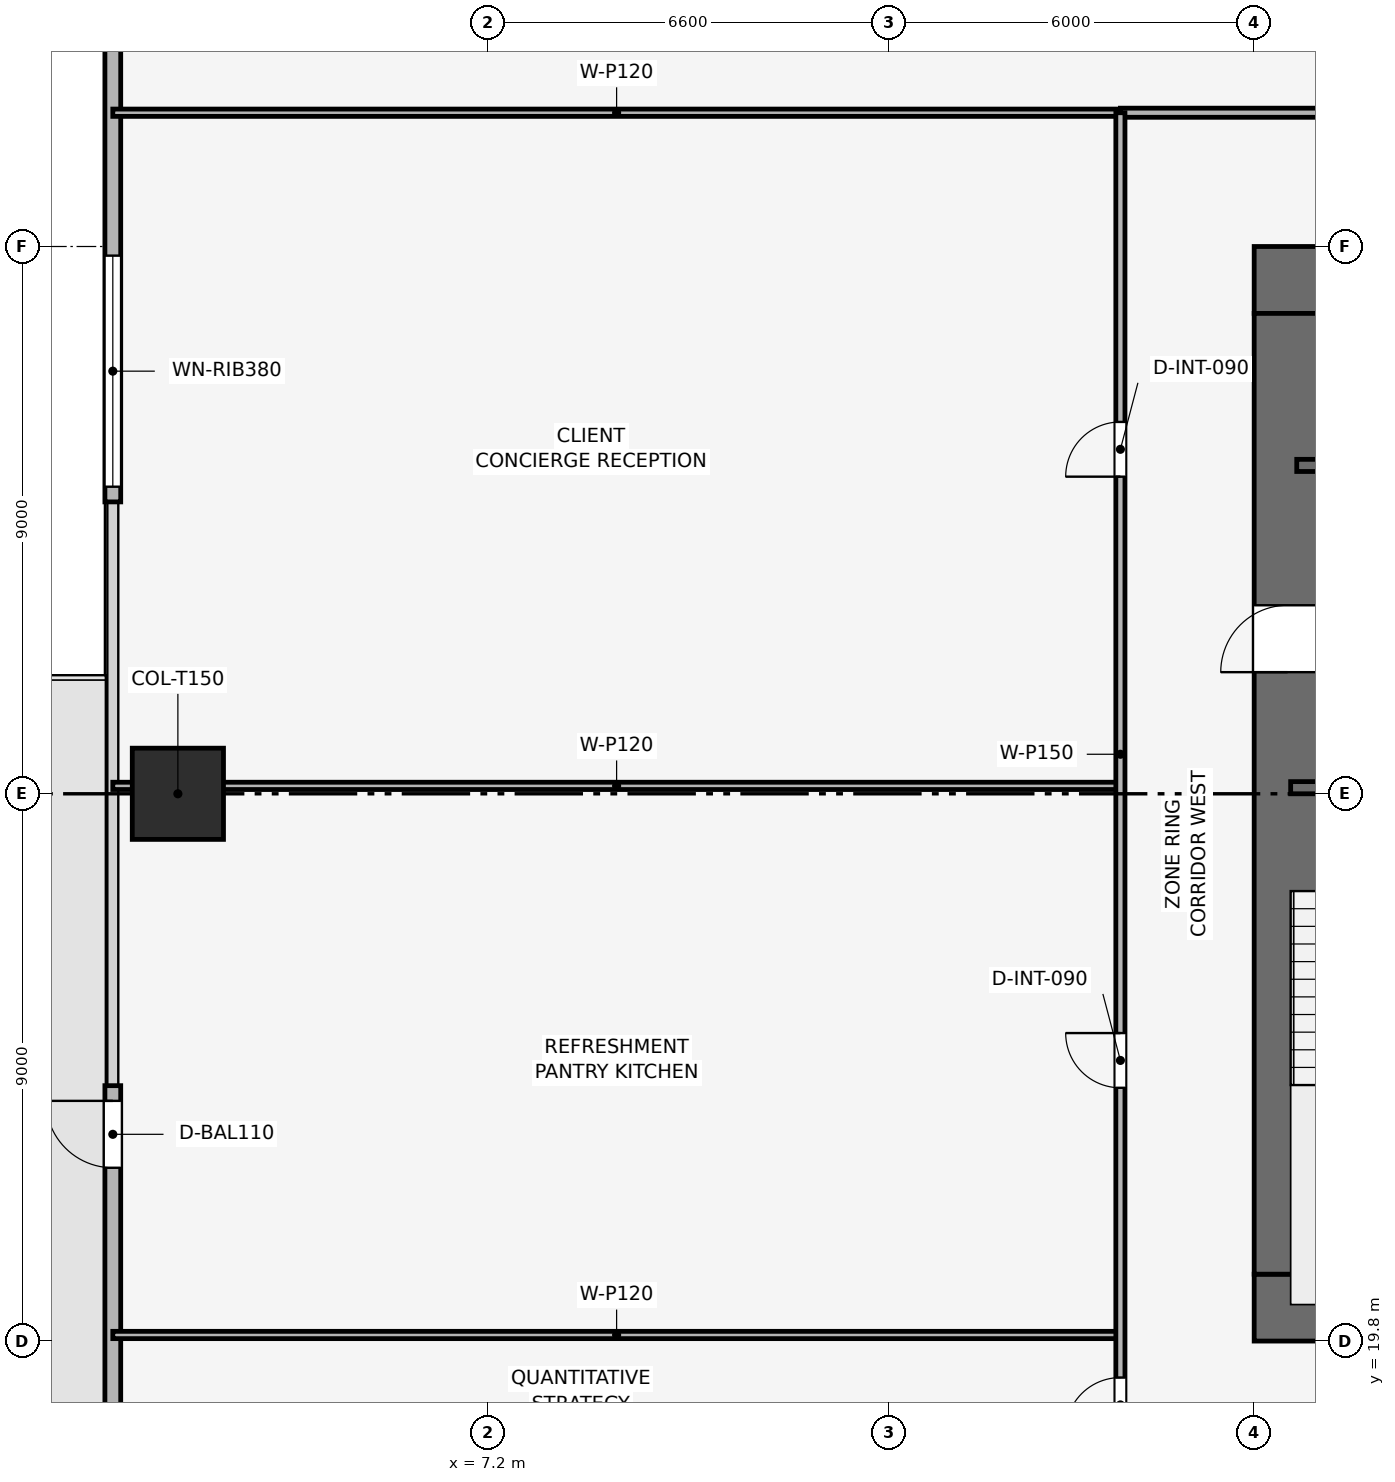
"""IFC4 building model, lengths in metres.
Left out: names, types, materials, properties, quantities, classifications, styles, units other than length and angle.
Written with IfcOpenShell. Run it as: python <this file> out.ifc"""

import sys

from ifc_helpers import new_model, si_unit, direction, frame, frame_2d, origin, origin_2d, place, context, subcontext, project, spatial, rectangle, extrude, element, fill, save


model = new_model("IFC4")
c1 = context("Model", 3, precision=1e-05, world=origin(), true_north=direction((0.0, 1.0)))
c2 = subcontext(c1, "Body", "Model", "MODEL_VIEW")
j1 = project(units=[si_unit("LENGTHUNIT", "METRE"), si_unit("PLANEANGLEUNIT", "RADIAN")], contexts=[c1])
p1 = place(None, origin())
s1 = spatial("IfcSite", under=j1, at=p1, CompositionType="ELEMENT")
p2 = place(p1, origin())
s2 = spatial("IfcBuilding", under=s1, at=p2, CompositionType="ELEMENT")
p3 = place(p2, frame((0.0, 0.0, 92.4)))
s3 = spatial("IfcBuildingStorey", under=s2, at=p3, CompositionType="ELEMENT", Elevation=92.4)
p4 = place(p3, frame((19.8, 20.35, 0.0), z_axis=(0.0, 0.0, 1.0), x_axis=(1.0, 0.0, 0.0)))
e1 = element("IfcWall", 1, at=p4, inside=s3, PredefinedType="SHEAR", context=c2, shape_type="SweptSolid", body=[
    extrude(rectangle(XDim=18.0, YDim=1.1, at=frame_2d((9.0, 0.0))), origin(), (0.0, 0.0, 1.0), 3.9),
])
p5 = place(p4, frame((8.4, 0.0, 0.0)))
e2 = element("IfcOpeningElement", 2, at=p5, cuts=e1, PredefinedType="OPENING", context=c2, shape_type="SweptSolid", body=[
    extrude(rectangle(XDim=1.2, YDim=2.2, at=frame_2d((0.6, 1.1))), frame((0.0, 0.56, 0.0), z_axis=(0.0, -1.0, 0.0), x_axis=(1.0, 0.0, 0.0)), (0.0, 0.0, 1.0), 1.12),
])
p6 = place(p3, frame((19.8, 37.25, 0.0), z_axis=(0.0, 0.0, 1.0), x_axis=(1.0, 0.0, 0.0)))
e3 = element("IfcWall", 3, at=p6, inside=s3, PredefinedType="SHEAR", context=c2, shape_type="SweptSolid", body=[
    extrude(rectangle(XDim=18.0, YDim=1.1, at=frame_2d((9.0, 0.0))), origin(), (0.0, 0.0, 1.0), 3.9),
])
p7 = place(p6, frame((7.05, 0.0, 0.0)))
e4 = element("IfcOpeningElement", 4, at=p7, cuts=e3, PredefinedType="OPENING", context=c2, shape_type="SweptSolid", body=[
    extrude(rectangle(XDim=1.1, YDim=2.15, at=frame_2d((0.55, 1.075))), frame((0.0, 0.56, 0.0), z_axis=(0.0, -1.0, 0.0), x_axis=(1.0, 0.0, 0.0)), (0.0, 0.0, 1.0), 1.12),
])
p8 = place(p3, frame((20.35, 20.9, 0.0), z_axis=(0.0, 0.0, 1.0), x_axis=(0.0, 1.0, 0.0)))
e5 = element("IfcWall", 5, at=p8, inside=s3, PredefinedType="SHEAR", context=c2, shape_type="SweptSolid", body=[
    extrude(rectangle(XDim=15.8, YDim=1.1, at=frame_2d((7.9, 0.0))), origin(), (0.0, 0.0, 1.0), 3.9),
])
p9 = place(p8, frame((9.9, 0.0, 0.0)))
e6 = element("IfcOpeningElement", 6, at=p9, cuts=e5, PredefinedType="OPENING", context=c2, shape_type="SweptSolid", body=[
    extrude(rectangle(XDim=1.1, YDim=2.15, at=frame_2d((0.55, 1.075))), frame((0.0, 0.56, 0.0), z_axis=(0.0, -1.0, 0.0), x_axis=(1.0, 0.0, 0.0)), (0.0, 0.0, 1.0), 1.12),
])
p10 = place(p3, frame((2.1, 28.8, 0.003), z_axis=(0.0, 0.0, 1.0), x_axis=(1.0, 0.0, 0.0)))
e7 = element("IfcColumn", 7, at=p10, inside=s3, PredefinedType="COLUMN", context=c2, shape_type="SweptSolid", body=[
    extrude(rectangle(XDim=1.5, YDim=1.5, at=origin_2d()), origin(), (0.0, 0.0, 1.0), 3.644),
])
p11 = place(p3, frame((1.03, 8.7, 0.0), z_axis=(0.0, 0.0, 1.0), x_axis=(0.0, 1.0, 0.0)))
e8 = element("IfcWall", 8, at=p11, inside=s3, PredefinedType="SOLIDWALL", context=c2, shape_type="SweptSolid", body=[
    extrude(rectangle(XDim=15.3, YDim=0.26, at=frame_2d((7.65, 0.0))), origin(), (0.0, 0.0, 1.0), 3.65),
])
p12 = place(p11, frame((13.95, 0.0, 0.0)))
e9 = element("IfcOpeningElement", 9, at=p12, cuts=e8, PredefinedType="OPENING", context=c2, shape_type="SweptSolid", body=[
    extrude(rectangle(XDim=1.1, YDim=2.2, at=frame_2d((0.55, 1.1))), frame((0.0, 0.14, 0.0), z_axis=(0.0, -1.0, 0.0), x_axis=(1.0, 0.0, 0.0)), (0.0, 0.0, 1.0), 0.28),
])
p13 = place(p3, frame((1.03, 33.6, 0.0), z_axis=(0.0, 0.0, 1.0), x_axis=(0.0, 1.0, 0.0)))
e10 = element("IfcWall", 10, at=p13, inside=s3, PredefinedType="SOLIDWALL", context=c2, shape_type="SweptSolid", body=[
    extrude(rectangle(XDim=15.3, YDim=0.26, at=frame_2d((7.65, 0.0))), origin(), (0.0, 0.0, 1.0), 3.65),
])
p14 = place(p13, frame((0.25, 0.0, 0.9)))
e11 = element("IfcOpeningElement", 11, at=p14, cuts=e10, PredefinedType="OPENING", context=c2, shape_type="SweptSolid", body=[
    extrude(rectangle(XDim=3.8, YDim=1.9, at=frame_2d((1.9, 0.95))), frame((0.0, 0.14, 0.0), z_axis=(0.0, -1.0, 0.0), x_axis=(1.0, 0.0, 0.0)), (0.0, 0.0, 1.0), 0.28),
])
p15 = place(p3, frame((20.4, 28.9, 0.0), z_axis=(0.0, 0.0, 1.0), x_axis=(1.0, 0.0, 0.0)))
e12 = element("IfcWall", 12, at=p15, inside=s3, PredefinedType="SHEAR", context=c2, shape_type="SweptSolid", body=[
    extrude(rectangle(XDim=3.15, YDim=0.2, at=frame_2d((1.575, 0.0))), origin(), (0.0, 0.0, 1.0), 3.65),
])
p16 = place(p15, frame((0.8, 0.0, 0.0)))
e13 = element("IfcOpeningElement", 13, at=p16, cuts=e12, PredefinedType="OPENING", context=c2, shape_type="SweptSolid", body=[
    extrude(rectangle(XDim=1.0, YDim=2.1, at=frame_2d((0.5, 1.05))), frame((0.0, 0.11, 0.0), z_axis=(0.0, -1.0, 0.0), x_axis=(1.0, 0.0, 0.0)), (0.0, 0.0, 1.0), 0.22),
])
p17 = place(p3, frame((20.5, 34.2, 0.0), z_axis=(0.0, 0.0, 1.0), x_axis=(1.0, 0.0, 0.0)))
e14 = element("IfcWall", 14, at=p17, inside=s3, PredefinedType="SHEAR", context=c2, shape_type="SweptSolid", body=[
    extrude(rectangle(XDim=3.05, YDim=0.2, at=frame_2d((1.525, 0.0))), origin(), (0.0, 0.0, 1.0), 3.65),
])
p18 = place(p17, frame((0.75, 0.0, 0.0)))
e15 = element("IfcOpeningElement", 15, at=p18, cuts=e14, PredefinedType="OPENING", context=c2, shape_type="SweptSolid", body=[
    extrude(rectangle(XDim=1.1, YDim=2.15, at=frame_2d((0.55, 1.075))), frame((0.0, 0.11, 0.0), z_axis=(0.0, -1.0, 0.0), x_axis=(1.0, 0.0, 0.0)), (0.0, 0.0, 1.0), 0.22),
])
for number, where, z_axis, x_axis in (
    (16, (1.03, 40.0, 0.0), (0.0, 0.0, 1.0), (1.0, 0.0, 0.0)),
    (17, (1.03, 19.9, 0.0), (0.0, 0.0, 1.0), (1.0, 0.0, 0.0)),
):
    element("IfcWall", number, at=place(p3, frame(where, z_axis=z_axis, x_axis=x_axis)), inside=s3, PredefinedType="PARTITIONING", context=c2, shape_type="SweptSolid", body=[
        extrude(rectangle(XDim=16.57, YDim=0.12, at=frame_2d((8.285, 0.0))), origin(), (0.0, 0.0, 1.0), 2.935),
    ])
p19 = place(p3, frame((1.03, 28.93, 0.0), z_axis=(0.0, 0.0, 1.0), x_axis=(1.0, 0.0, 0.0)))
e18 = element("IfcWall", 18, at=p19, inside=s3, PredefinedType="PARTITIONING", context=c2, shape_type="SweptSolid", body=[
    extrude(rectangle(XDim=16.57, YDim=0.12, at=frame_2d((8.285, 0.0))), origin(), (0.0, 0.0, 1.0), 3.085),
])
p20 = place(p3, frame((17.6, 40.0, 0.0), z_axis=(0.0, 0.0, 1.0), x_axis=(1.0, 0.0, 0.0)))
e19 = element("IfcWall", 19, at=p20, inside=s3, PredefinedType="PARTITIONING", context=c2, shape_type="SweptSolid", body=[
    extrude(rectangle(XDim=22.4, YDim=0.15, at=frame_2d((11.2, 0.0))), origin(), (0.0, 0.0, 1.0), 3.085),
])
p21 = place(p20, frame((10.75, 0.0, 0.0)))
e20 = element("IfcOpeningElement", 20, at=p21, cuts=e19, PredefinedType="OPENING", context=c2, shape_type="SweptSolid", body=[
    extrude(rectangle(XDim=0.9, YDim=2.1, at=frame_2d((0.45, 1.05))), frame((0.0, 0.085, 0.0), z_axis=(0.0, -1.0, 0.0), x_axis=(1.0, 0.0, 0.0)), (0.0, 0.0, 1.0), 0.17),
])
p22 = place(p3, frame((17.6, 17.6, 0.0), z_axis=(0.0, 0.0, 1.0), x_axis=(0.0, 1.0, 0.0)))
e21 = element("IfcWall", 21, at=p22, inside=s3, PredefinedType="PARTITIONING", context=c2, shape_type="SweptSolid", body=[
    extrude(rectangle(XDim=22.4, YDim=0.15, at=frame_2d((11.2, 0.0))), origin(), (0.0, 0.0, 1.0), 3.085),
])
p23 = place(p22, frame((0.7, 0.0, 0.0)))
e22 = element("IfcOpeningElement", 22, at=p23, cuts=e21, PredefinedType="OPENING", context=c2, shape_type="SweptSolid", body=[
    extrude(rectangle(XDim=0.9, YDim=2.1, at=frame_2d((0.45, 1.05))), frame((0.0, 0.085, 0.0), z_axis=(0.0, -1.0, 0.0), x_axis=(1.0, 0.0, 0.0)), (0.0, 0.0, 1.0), 0.17),
])
p24 = place(p22, frame((6.365, 0.0, 0.0)))
e23 = element("IfcOpeningElement", 23, at=p24, cuts=e21, PredefinedType="OPENING", context=c2, shape_type="SweptSolid", body=[
    extrude(rectangle(XDim=0.9, YDim=2.1, at=frame_2d((0.45, 1.05))), frame((0.0, 0.085, 0.0), z_axis=(0.0, -1.0, 0.0), x_axis=(1.0, 0.0, 0.0)), (0.0, 0.0, 1.0), 0.17),
])
p25 = place(p22, frame((16.415, 0.0, 0.0)))
e24 = element("IfcOpeningElement", 24, at=p25, cuts=e21, PredefinedType="OPENING", context=c2, shape_type="SweptSolid", body=[
    extrude(rectangle(XDim=0.9, YDim=2.1, at=frame_2d((0.45, 1.05))), frame((0.0, 0.085, 0.0), z_axis=(0.0, -1.0, 0.0), x_axis=(1.0, 0.0, 0.0)), (0.0, 0.0, 1.0), 0.17),
])
p26 = place(p12, origin())
e25 = element("IfcDoor", 25, at=p26, inside=s3, OperationType="SINGLE_SWING_RIGHT", PredefinedType="DOOR", context=c2, shape_type="SweptSolid", body=[
    extrude(rectangle(XDim=1.1, YDim=2.2, at=frame_2d((0.55, 1.1))), frame((0.0, 0.025, 0.0), z_axis=(0.0, -1.0, 0.0), x_axis=(1.0, 0.0, 0.0)), (0.0, 0.0, 1.0), 0.05),
])
fill(e9, e25)
p27 = place(p14, origin())
e26 = element("IfcWindow", 26, at=p27, inside=s3, PartitioningType="SINGLE_PANEL", PredefinedType="WINDOW", context=c2, shape_type="SweptSolid", body=[
    extrude(rectangle(XDim=3.8, YDim=1.9, at=frame_2d((1.9, 0.95))), frame((0.0, 0.03, 0.0), z_axis=(0.0, -1.0, 0.0), x_axis=(1.0, 0.0, 0.0)), (0.0, 0.0, 1.0), 0.06),
])
fill(e11, e26)
p28 = place(p23, origin())
e27 = element("IfcDoor", 27, at=p28, inside=s3, OperationType="SINGLE_SWING_LEFT", PredefinedType="DOOR", context=c2, shape_type="SweptSolid", body=[
    extrude(rectangle(XDim=0.9, YDim=2.1, at=frame_2d((0.45, 1.05))), frame((0.0, 0.025, 0.0), z_axis=(0.0, -1.0, 0.0), x_axis=(1.0, 0.0, 0.0)), (0.0, 0.0, 1.0), 0.05),
])
fill(e22, e27)
p29 = place(p24, origin())
e28 = element("IfcDoor", 28, at=p29, inside=s3, OperationType="SINGLE_SWING_RIGHT", PredefinedType="DOOR", context=c2, shape_type="SweptSolid", body=[
    extrude(rectangle(XDim=0.9, YDim=2.1, at=frame_2d((0.45, 1.05))), frame((0.0, 0.025, 0.0), z_axis=(0.0, -1.0, 0.0), x_axis=(1.0, 0.0, 0.0)), (0.0, 0.0, 1.0), 0.05),
])
fill(e23, e28)
p30 = place(p25, origin())
e29 = element("IfcDoor", 29, at=p30, inside=s3, OperationType="SINGLE_SWING_LEFT", PredefinedType="DOOR", context=c2, shape_type="SweptSolid", body=[
    extrude(rectangle(XDim=0.9, YDim=2.1, at=frame_2d((0.45, 1.05))), frame((0.0, 0.025, 0.0), z_axis=(0.0, -1.0, 0.0), x_axis=(1.0, 0.0, 0.0)), (0.0, 0.0, 1.0), 0.05),
])
fill(e24, e29)
p31 = place(p9, origin())
e30 = element("IfcDoor", 30, at=p31, inside=s3, OperationType="SINGLE_SWING_LEFT", PredefinedType="DOOR", context=c2, shape_type="SweptSolid", body=[
    extrude(rectangle(XDim=1.1, YDim=2.15, at=frame_2d((0.55, 1.075))), frame((0.0, 0.025, 0.0), z_axis=(0.0, -1.0, 0.0), x_axis=(1.0, 0.0, 0.0)), (0.0, 0.0, 1.0), 0.05),
])
fill(e6, e30)
save(model, sys.argv[1])
